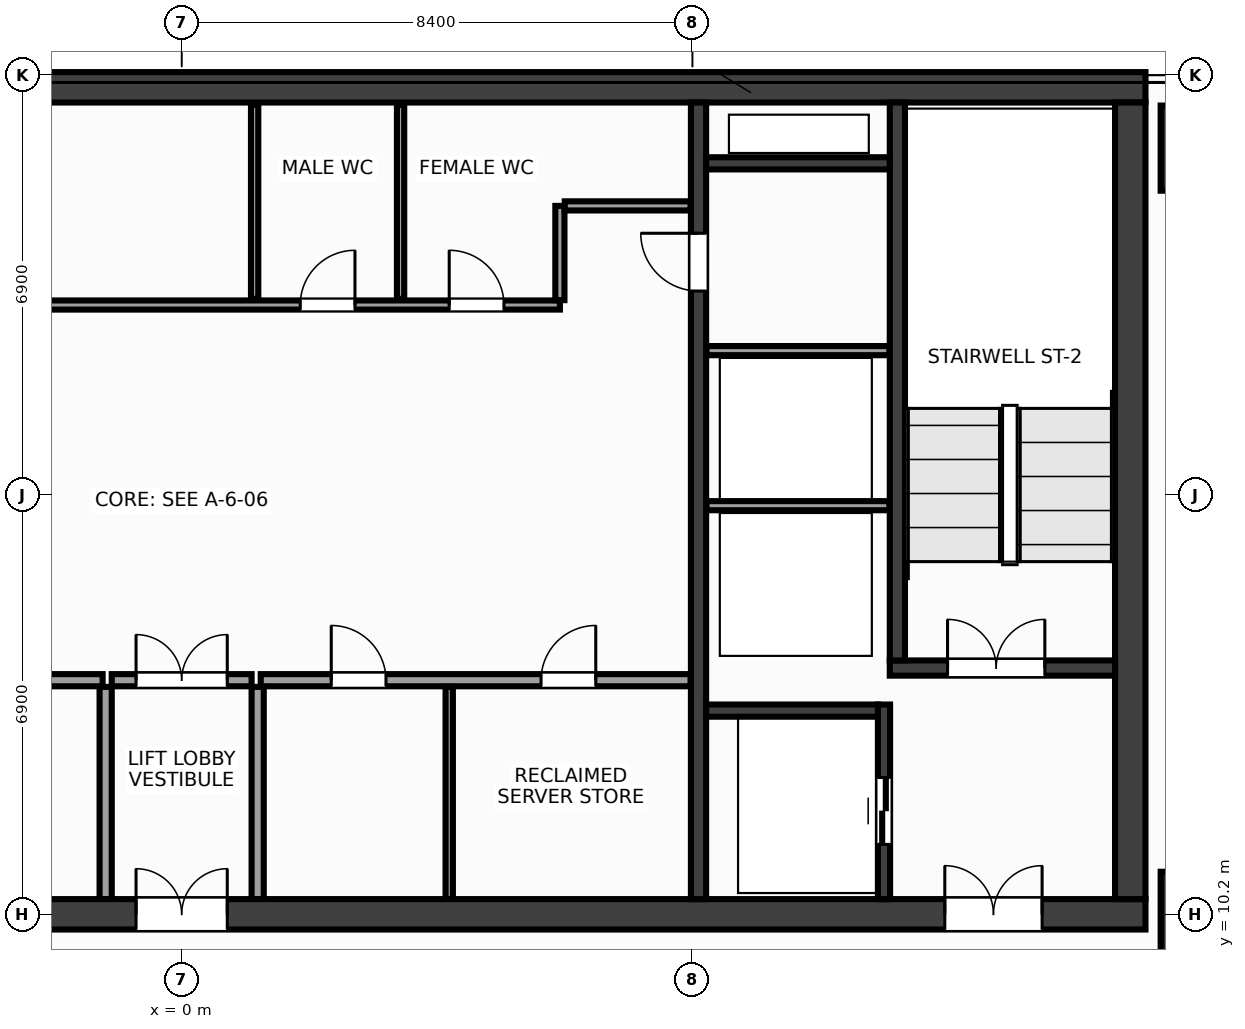
"""IFC4 building model, lengths in metres.
Left out: names, types, materials, properties, quantities, classifications, styles, units other than length and angle.
Written with IfcOpenShell. Run it as: python <this file> out.ifc"""

import sys

from ifc_helpers import new_model, si_unit, direction, frame, frame_2d, origin, origin_2d, place, context, subcontext, project, spatial, rectangle, extrude, source, transform, mapped, element, fill, save


model = new_model("IFC4")
c1 = context("Model", 3, precision=1e-05, world=origin(), true_north=direction((0.0, 1.0)))
c2 = subcontext(c1, "Body", "Model", "MODEL_VIEW")
j1 = project(units=[si_unit("LENGTHUNIT", "METRE"), si_unit("PLANEANGLEUNIT", "RADIAN")], contexts=[c1])
p1 = place(None, origin())
s1 = spatial("IfcSite", under=j1, at=p1, CompositionType="ELEMENT")
p2 = place(p1, origin())
s2 = spatial("IfcBuilding", under=s1, at=p2, CompositionType="ELEMENT")
p3 = place(p2, frame((0.0, 0.0, 221.6)))
s3 = spatial("IfcBuildingStorey", under=s2, at=p3, CompositionType="ELEMENT", Elevation=221.6)
m1 = source(origin(), c2, "Body", "SweptSolid", [
    extrude(rectangle(XDim=31.7, YDim=0.5, at=frame_2d((15.85, 0.0))), origin(), (0.0, 0.0, 1.0), 3.6),
])
p4 = place(p3, frame((-15.85, 23.8, 0.0), z_axis=(0.0, 0.0, 1.0), x_axis=(1.0, 0.0, 0.0)))
e1 = element("IfcWall", 1, at=p4, inside=s3, PredefinedType="SHEAR", context=c2, shape_type="MappedRepresentation", body=[
    mapped(m1, transform((0.0, 0.0, 0.0), x_axis=(1.0, 0.0, 0.0), y_axis=(0.0, 1.0, 0.0), z_axis=(0.0, 0.0, 1.0), scale=1.0)),
])
p5 = place(p3, frame((-15.85, 10.2, 0.0), z_axis=(0.0, 0.0, 1.0), x_axis=(1.0, 0.0, 0.0)))
e2 = element("IfcWall", 2, at=p5, inside=s3, PredefinedType="SHEAR", context=c2, shape_type="MappedRepresentation", body=[
    mapped(m1, transform((0.0, 0.0, 0.0), x_axis=(1.0, 0.0, 0.0), y_axis=(0.0, 1.0, 0.0), z_axis=(0.0, 0.0, 1.0), scale=1.0)),
])
p6 = place(p5, frame((1.7, 0.0, 0.0)))
e3 = element("IfcOpeningElement", 3, at=p6, cuts=e2, PredefinedType="OPENING", context=c2, shape_type="SweptSolid", body=[
    extrude(rectangle(XDim=1.6, YDim=2.15, at=frame_2d((0.8, 1.075))), frame((0.0, 0.262, 0.0), z_axis=(0.0, -1.0, 0.0), x_axis=(1.0, 0.0, 0.0)), (0.0, 0.0, 1.0), 0.524),
])
p7 = place(p5, frame((28.4, 0.0, 0.0)))
e4 = element("IfcOpeningElement", 4, at=p7, cuts=e2, PredefinedType="OPENING", context=c2, shape_type="SweptSolid", body=[
    extrude(rectangle(XDim=1.6, YDim=2.15, at=frame_2d((0.8, 1.075))), frame((0.0, 0.262, 0.0), z_axis=(0.0, -1.0, 0.0), x_axis=(1.0, 0.0, 0.0)), (0.0, 0.0, 1.0), 0.524),
])
p8 = place(p5, frame((15.1, 0.0, 0.0)))
e5 = element("IfcOpeningElement", 5, at=p8, cuts=e2, PredefinedType="OPENING", context=c2, shape_type="SweptSolid", body=[
    extrude(rectangle(XDim=1.5, YDim=2.2, at=frame_2d((0.75, 1.1))), frame((0.0, 0.262, 0.0), z_axis=(0.0, -1.0, 0.0), x_axis=(1.0, 0.0, 0.0)), (0.0, 0.0, 1.0), 0.524),
])
m2 = source(origin(), c2, "Body", "SweptSolid", [
    extrude(rectangle(XDim=13.1, YDim=0.5, at=frame_2d((6.55, 0.0))), origin(), (0.0, 0.0, 1.0), 3.6),
])
p9 = place(p3, frame((15.6, 10.45, 0.0), z_axis=(0.0, 0.0, 1.0), x_axis=(0.0, 1.0, 0.0)))
e6 = element("IfcWall", 6, at=p9, inside=s3, PredefinedType="SHEAR", context=c2, shape_type="MappedRepresentation", body=[
    mapped(m2, transform((0.0, 0.0, 0.0), x_axis=(1.0, 0.0, 0.0), y_axis=(0.0, 1.0, 0.0), z_axis=(0.0, 0.0, 1.0), scale=1.0)),
])
m3 = source(origin(), c2, "Body", "SweptSolid", [
    extrude(rectangle(XDim=13.1, YDim=0.25, at=frame_2d((6.55, 0.0))), origin(), (0.0, 0.0, 1.0), 3.6),
])
p10 = place(p3, frame((8.5, 10.45, 0.0), z_axis=(0.0, 0.0, 1.0), x_axis=(0.0, 1.0, 0.0)))
e7 = element("IfcWall", 7, at=p10, inside=s3, PredefinedType="SHEAR", context=c2, shape_type="MappedRepresentation", body=[
    mapped(m3, transform((0.0, 0.0, 0.0), x_axis=(1.0, 0.0, 0.0), y_axis=(0.0, 1.0, 0.0), z_axis=(0.0, 0.0, 1.0), scale=1.0)),
])
p11 = place(p10, frame((10.0, 0.0, 0.0)))
e8 = element("IfcOpeningElement", 8, at=p11, cuts=e7, PredefinedType="OPENING", context=c2, shape_type="SweptSolid", body=[
    extrude(rectangle(XDim=0.95, YDim=2.15, at=frame_2d((0.475, 1.075))), frame((0.0, 0.137, 0.0), z_axis=(0.0, -1.0, 0.0), x_axis=(1.0, 0.0, 0.0)), (0.0, 0.0, 1.0), 0.274),
])
m4 = source(origin(), c2, "Body", "SweptSolid", [
    extrude(rectangle(XDim=3.705, YDim=0.25, at=frame_2d((1.853, 0.0))), origin(), (0.0, 0.0, 1.0), 3.6),
])
p12 = place(p3, frame((11.645, 14.25, 0.0), z_axis=(0.0, 0.0, 1.0), x_axis=(1.0, 0.0, 0.0)))
e9 = element("IfcWall", 9, at=p12, inside=s3, PredefinedType="SHEAR", context=c2, shape_type="MappedRepresentation", body=[
    mapped(m4, transform((0.0, 0.0, 0.0), x_axis=(1.0, 0.0, 0.0), y_axis=(0.0, 1.0, 0.0), z_axis=(0.0, 0.0, 1.0), scale=1.0)),
])
p13 = place(p12, frame((0.95, 0.0, 0.0)))
e10 = element("IfcOpeningElement", 10, at=p13, cuts=e9, PredefinedType="OPENING", context=c2, shape_type="SweptSolid", body=[
    extrude(rectangle(XDim=1.6, YDim=2.15, at=frame_2d((0.8, 1.075))), frame((0.0, 0.137, 0.0), z_axis=(0.0, -1.0, 0.0), x_axis=(1.0, 0.0, 0.0)), (0.0, 0.0, 1.0), 0.274),
])
m5 = source(origin(), c2, "Body", "SweptSolid", [
    extrude(rectangle(XDim=9.175, YDim=0.25, at=frame_2d((4.587, 0.0))), origin(), (0.0, 0.0, 1.0), 3.6),
])
p14 = place(p3, frame((11.77, 14.375, 0.0), z_axis=(0.0, 0.0, 1.0), x_axis=(0.0, 1.0, 0.0)))
e11 = element("IfcWall", 11, at=p14, inside=s3, PredefinedType="SHEAR", context=c2, shape_type="MappedRepresentation", body=[
    mapped(m5, transform((0.0, 0.0, 0.0), x_axis=(1.0, 0.0, 0.0), y_axis=(0.0, 1.0, 0.0), z_axis=(0.0, 0.0, 1.0), scale=1.0)),
])
m6 = source(origin(), c2, "Body", "SweptSolid", [
    extrude(rectangle(XDim=3.2, YDim=0.2, at=frame_2d((1.6, 0.0))), origin(), (0.0, 0.0, 1.0), 3.6),
])
p15 = place(p3, frame((11.55, 10.45, 0.0), z_axis=(0.0, 0.0, 1.0), x_axis=(0.0, 1.0, 0.0)))
e12 = element("IfcWall", 12, at=p15, inside=s3, PredefinedType="SHEAR", context=c2, shape_type="MappedRepresentation", body=[
    mapped(m6, transform((0.0, 0.0, 0.0), x_axis=(1.0, 0.0, 0.0), y_axis=(0.0, 1.0, 0.0), z_axis=(0.0, 0.0, 1.0), scale=1.0)),
])
p16 = place(p15, frame((0.9, 0.0, 0.0)))
e13 = element("IfcOpeningElement", 13, at=p16, cuts=e12, PredefinedType="OPENING", context=c2, shape_type="SweptSolid", body=[
    extrude(rectangle(XDim=1.1, YDim=2.15, at=frame_2d((0.55, 1.075))), frame((0.0, 0.112, 0.0), z_axis=(0.0, -1.0, 0.0), x_axis=(1.0, 0.0, 0.0)), (0.0, 0.0, 1.0), 0.224),
])
m7 = source(origin(), c2, "Body", "SweptSolid", [
    extrude(rectangle(XDim=2.825, YDim=0.2, at=frame_2d((1.413, 0.0))), origin(), (0.0, 0.0, 1.0), 3.6),
])
p17 = place(p3, frame((8.625, 13.55, 0.0), z_axis=(0.0, 0.0, 1.0), x_axis=(1.0, 0.0, 0.0)))
e14 = element("IfcWall", 14, at=p17, inside=s3, PredefinedType="SHEAR", context=c2, shape_type="MappedRepresentation", body=[
    mapped(m7, transform((0.0, 0.0, 0.0), x_axis=(1.0, 0.0, 0.0), y_axis=(0.0, 1.0, 0.0), z_axis=(0.0, 0.0, 1.0), scale=1.0)),
])
m8 = source(origin(), c2, "Body", "SweptSolid", [
    extrude(rectangle(XDim=3.02, YDim=0.2, at=frame_2d((1.51, 0.0))), origin(), (0.0, 0.0, 1.0), 3.6),
])
p18 = place(p3, frame((8.625, 22.55, 0.0), z_axis=(0.0, 0.0, 1.0), x_axis=(1.0, 0.0, 0.0)))
e15 = element("IfcWall", 15, at=p18, inside=s3, PredefinedType="SHEAR", context=c2, shape_type="MappedRepresentation", body=[
    mapped(m8, transform((0.0, 0.0, 0.0), x_axis=(1.0, 0.0, 0.0), y_axis=(0.0, 1.0, 0.0), z_axis=(0.0, 0.0, 1.0), scale=1.0)),
])
m9 = source(origin(), c2, "Body", "SweptSolid", [
    extrude(rectangle(XDim=1.4, YDim=1.4, at=origin_2d()), origin(), (0.0, 0.0, 1.0), 3.6),
])
for number, where, z_axis, x_axis in (
    (16, (16.8, 10.2, 0.0), (0.0, 0.0, 1.0), (1.0, 0.0, 0.0)),
    (17, (16.8, 22.8, 0.0), (0.0, 0.0, 1.0), (1.0, 0.0, 0.0)),
):
    element("IfcColumn", number, at=place(p3, frame(where, z_axis=z_axis, x_axis=x_axis)), inside=s3, PredefinedType="COLUMN", context=c2, shape_type="MappedRepresentation", body=[
        mapped(m9, transform((0.0, 0.0, 0.0), x_axis=(1.0, 0.0, 0.0), y_axis=(0.0, 1.0, 0.0), z_axis=(0.0, 0.0, 1.0), scale=1.0)),
    ])
m10 = source(origin(), c2, "Body", "SweptSolid", [
    extrude(rectangle(XDim=3.01, YDim=0.15, at=frame_2d((1.505, 0.0))), origin(), (0.0, 0.0, 1.0), 3.38),
])
for number, where, z_axis, x_axis in (
    (18, (8.63, 16.92, 0.0), (0.0, 0.0, 1.0), (1.0, 0.0, 0.0)),
    (19, (8.63, 19.47, 0.0), (0.0, 0.0, 1.0), (1.0, 0.0, 0.0)),
):
    element("IfcWall", number, at=place(p3, frame(where, z_axis=z_axis, x_axis=x_axis)), inside=s3, PredefinedType="PARTITIONING", context=c2, shape_type="MappedRepresentation", body=[
        mapped(m10, transform((0.0, 0.0, 0.0), x_axis=(1.0, 0.0, 0.0), y_axis=(0.0, 1.0, 0.0), z_axis=(0.0, 0.0, 1.0), scale=1.0)),
    ])
m11 = source(origin(), c2, "Body", "SweptSolid", [
    extrude(rectangle(XDim=7.07, YDim=0.2, at=frame_2d((3.535, 0.0))), origin(), (0.0, 0.0, 1.0), 3.38),
])
p19 = place(p3, frame((-8.37, 14.05, 0.0), z_axis=(0.0, 0.0, 1.0), x_axis=(1.0, 0.0, 0.0)))
e20 = element("IfcWall", 20, at=p19, inside=s3, PredefinedType="PARTITIONING", context=c2, shape_type="MappedRepresentation", body=[
    mapped(m11, transform((0.0, 0.0, 0.0), x_axis=(1.0, 0.0, 0.0), y_axis=(0.0, 1.0, 0.0), z_axis=(0.0, 0.0, 1.0), scale=1.0)),
])
p20 = place(p19, frame((2.8, 0.0, 0.0)))
e21 = element("IfcOpeningElement", 21, at=p20, cuts=e20, PredefinedType="OPENING", context=c2, shape_type="SweptSolid", body=[
    extrude(rectangle(XDim=0.98, YDim=2.15, at=frame_2d((0.49, 1.075))), frame((0.0, 0.112, 0.0), z_axis=(0.0, -1.0, 0.0), x_axis=(1.0, 0.0, 0.0)), (0.0, 0.0, 1.0), 0.224),
])
p21 = place(p3, frame((1.3, 14.05, 0.0), z_axis=(0.0, 0.0, 1.0), x_axis=(1.0, 0.0, 0.0)))
e22 = element("IfcWall", 22, at=p21, inside=s3, PredefinedType="PARTITIONING", context=c2, shape_type="MappedRepresentation", body=[
    mapped(m11, transform((0.0, 0.0, 0.0), x_axis=(1.0, 0.0, 0.0), y_axis=(0.0, 1.0, 0.0), z_axis=(0.0, 0.0, 1.0), scale=1.0)),
])
p22 = place(p21, frame((1.16, 0.0, 0.0)))
e23 = element("IfcOpeningElement", 23, at=p22, cuts=e22, PredefinedType="OPENING", context=c2, shape_type="SweptSolid", body=[
    extrude(rectangle(XDim=0.9, YDim=2.15, at=frame_2d((0.45, 1.075))), frame((0.0, 0.112, 0.0), z_axis=(0.0, -1.0, 0.0), x_axis=(1.0, 0.0, 0.0)), (0.0, 0.0, 1.0), 0.224),
])
p23 = place(p21, frame((4.61, 0.0, 0.0)))
e24 = element("IfcOpeningElement", 24, at=p23, cuts=e22, PredefinedType="OPENING", context=c2, shape_type="SweptSolid", body=[
    extrude(rectangle(XDim=0.9, YDim=2.15, at=frame_2d((0.45, 1.075))), frame((0.0, 0.112, 0.0), z_axis=(0.0, -1.0, 0.0), x_axis=(1.0, 0.0, 0.0)), (0.0, 0.0, 1.0), 0.224),
])
m12 = source(origin(), c2, "Body", "SweptSolid", [
    extrude(rectangle(XDim=3.49, YDim=0.2, at=frame_2d((1.745, 0.0))), origin(), (0.0, 0.0, 1.0), 3.38),
])
for number, where, z_axis, x_axis in (
    (25, (-1.25, 10.45, 0.0), (0.0, 0.0, 1.0), (0.0, 1.0, 0.0)),
    (26, (1.25, 10.45, 0.0), (0.0, 0.0, 1.0), (0.0, 1.0, 0.0)),
):
    element("IfcWall", number, at=place(p3, frame(where, z_axis=z_axis, x_axis=x_axis)), inside=s3, PredefinedType="PARTITIONING", context=c2, shape_type="MappedRepresentation", body=[
        mapped(m12, transform((0.0, 0.0, 0.0), x_axis=(1.0, 0.0, 0.0), y_axis=(0.0, 1.0, 0.0), z_axis=(0.0, 0.0, 1.0), scale=1.0)),
    ])
m13 = source(origin(), c2, "Body", "SweptSolid", [
    extrude(rectangle(XDim=2.3, YDim=0.2, at=frame_2d((1.15, 0.0))), origin(), (0.0, 0.0, 1.0), 3.38),
])
p24 = place(p3, frame((-1.15, 14.05, 0.0), z_axis=(0.0, 0.0, 1.0), x_axis=(1.0, 0.0, 0.0)))
e27 = element("IfcWall", 27, at=p24, inside=s3, PredefinedType="PARTITIONING", context=c2, shape_type="MappedRepresentation", body=[
    mapped(m13, transform((0.0, 0.0, 0.0), x_axis=(1.0, 0.0, 0.0), y_axis=(0.0, 1.0, 0.0), z_axis=(0.0, 0.0, 1.0), scale=1.0)),
])
p25 = place(p24, frame((0.4, 0.0, 0.0)))
e28 = element("IfcOpeningElement", 28, at=p25, cuts=e27, PredefinedType="OPENING", context=c2, shape_type="SweptSolid", body=[
    extrude(rectangle(XDim=1.5, YDim=2.2, at=frame_2d((0.75, 1.1))), frame((0.0, 0.112, 0.0), z_axis=(0.0, -1.0, 0.0), x_axis=(1.0, 0.0, 0.0)), (0.0, 0.0, 1.0), 0.224),
])
m14 = source(origin(), c2, "Body", "SweptSolid", [
    extrude(rectangle(XDim=14.59, YDim=0.15, at=frame_2d((7.295, 0.0))), origin(), (0.0, 0.0, 1.0), 3.38),
])
p26 = place(p3, frame((-8.37, 20.22, 0.0), z_axis=(0.0, 0.0, 1.0), x_axis=(1.0, 0.0, 0.0)))
e29 = element("IfcWall", 29, at=p26, inside=s3, PredefinedType="PARTITIONING", context=c2, shape_type="MappedRepresentation", body=[
    mapped(m14, transform((0.0, 0.0, 0.0), x_axis=(1.0, 0.0, 0.0), y_axis=(0.0, 1.0, 0.0), z_axis=(0.0, 0.0, 1.0), scale=1.0)),
])
p27 = place(p26, frame((4.36, 0.0, 0.0)))
e30 = element("IfcOpeningElement", 30, at=p27, cuts=e29, PredefinedType="OPENING", context=c2, shape_type="SweptSolid", body=[
    extrude(rectangle(XDim=0.9, YDim=2.15, at=frame_2d((0.45, 1.075))), frame((0.0, 0.087, 0.0), z_axis=(0.0, -1.0, 0.0), x_axis=(1.0, 0.0, 0.0)), (0.0, 0.0, 1.0), 0.174),
])
p28 = place(p26, frame((10.32, 0.0, 0.0)))
e31 = element("IfcOpeningElement", 31, at=p28, cuts=e29, PredefinedType="OPENING", context=c2, shape_type="SweptSolid", body=[
    extrude(rectangle(XDim=0.9, YDim=2.15, at=frame_2d((0.45, 1.075))), frame((0.0, 0.087, 0.0), z_axis=(0.0, -1.0, 0.0), x_axis=(1.0, 0.0, 0.0)), (0.0, 0.0, 1.0), 0.174),
])
p29 = place(p26, frame((12.77, 0.0, 0.0)))
e32 = element("IfcOpeningElement", 32, at=p29, cuts=e29, PredefinedType="OPENING", context=c2, shape_type="SweptSolid", body=[
    extrude(rectangle(XDim=0.9, YDim=2.15, at=frame_2d((0.45, 1.075))), frame((0.0, 0.087, 0.0), z_axis=(0.0, -1.0, 0.0), x_axis=(1.0, 0.0, 0.0)), (0.0, 0.0, 1.0), 0.174),
])
m15 = source(origin(), c2, "Body", "SweptSolid", [
    extrude(rectangle(XDim=1.55, YDim=0.15, at=frame_2d((0.775, 0.0))), origin(), (0.0, 0.0, 1.0), 3.38),
])
p30 = place(p3, frame((6.22, 20.3, 0.0), z_axis=(0.0, 0.0, 1.0), x_axis=(0.0, 1.0, 0.0)))
e33 = element("IfcWall", 33, at=p30, inside=s3, PredefinedType="PARTITIONING", context=c2, shape_type="MappedRepresentation", body=[
    mapped(m15, transform((0.0, 0.0, 0.0), x_axis=(1.0, 0.0, 0.0), y_axis=(0.0, 1.0, 0.0), z_axis=(0.0, 0.0, 1.0), scale=1.0)),
])
m16 = source(origin(), c2, "Body", "SweptSolid", [
    extrude(rectangle(XDim=2.07, YDim=0.15, at=frame_2d((1.035, 0.0))), origin(), (0.0, 0.0, 1.0), 3.38),
])
p31 = place(p3, frame((6.3, 21.85, 0.0), z_axis=(0.0, 0.0, 1.0), x_axis=(1.0, 0.0, 0.0)))
e34 = element("IfcWall", 34, at=p31, inside=s3, PredefinedType="PARTITIONING", context=c2, shape_type="MappedRepresentation", body=[
    mapped(m16, transform((0.0, 0.0, 0.0), x_axis=(1.0, 0.0, 0.0), y_axis=(0.0, 1.0, 0.0), z_axis=(0.0, 0.0, 1.0), scale=1.0)),
])
m17 = source(origin(), c2, "Body", "SweptSolid", [
    extrude(rectangle(XDim=3.49, YDim=0.12, at=frame_2d((1.745, 0.0))), origin(), (0.0, 0.0, 1.0), 3.38),
])
p32 = place(p3, frame((4.4, 10.45, 0.0), z_axis=(0.0, 0.0, 1.0), x_axis=(0.0, 1.0, 0.0)))
e35 = element("IfcWall", 35, at=p32, inside=s3, PredefinedType="PARTITIONING", context=c2, shape_type="MappedRepresentation", body=[
    mapped(m17, transform((0.0, 0.0, 0.0), x_axis=(1.0, 0.0, 0.0), y_axis=(0.0, 1.0, 0.0), z_axis=(0.0, 0.0, 1.0), scale=1.0)),
])
m18 = source(origin(), c2, "Body", "SweptSolid", [
    extrude(rectangle(XDim=3.19, YDim=0.12, at=frame_2d((1.595, 0.0))), origin(), (0.0, 0.0, 1.0), 3.38),
])
for number, where, z_axis, x_axis in (
    (36, (1.2, 20.32, 0.0), (0.0, 0.0, 1.0), (0.0, 1.0, 0.0)),
    (37, (3.6, 20.32, 0.0), (0.0, 0.0, 1.0), (0.0, 1.0, 0.0)),
):
    element("IfcWall", number, at=place(p3, frame(where, z_axis=z_axis, x_axis=x_axis)), inside=s3, PredefinedType="PARTITIONING", context=c2, shape_type="MappedRepresentation", body=[
        mapped(m18, transform((0.0, 0.0, 0.0), x_axis=(1.0, 0.0, 0.0), y_axis=(0.0, 1.0, 0.0), z_axis=(0.0, 0.0, 1.0), scale=1.0)),
    ])
m19 = source(origin(), c2, "Body", "SweptSolid", [
    extrude(rectangle(XDim=1.6, YDim=2.15, at=frame_2d((0.8, 1.075))), frame((0.0, 0.025, 0.0), z_axis=(0.0, -1.0, 0.0), x_axis=(1.0, 0.0, 0.0)), (0.0, 0.0, 1.0), 0.05),
])
p33 = place(p13, origin())
e38 = element("IfcDoor", 38, at=p33, inside=s3, OperationType="DOUBLE_DOOR_SINGLE_SWING", PredefinedType="DOOR", context=c2, shape_type="MappedRepresentation", body=[
    mapped(m19, transform((0.0, 0.0, 0.0), x_axis=(1.0, 0.0, 0.0), y_axis=(0.0, 1.0, 0.0), z_axis=(0.0, 0.0, 1.0), scale=1.0)),
])
fill(e10, e38)
p34 = place(p7, origin())
e39 = element("IfcDoor", 39, at=p34, inside=s3, OperationType="DOUBLE_DOOR_SINGLE_SWING", PredefinedType="DOOR", context=c2, shape_type="MappedRepresentation", body=[
    mapped(m19, transform((0.0, 0.0, 0.0), x_axis=(1.0, 0.0, 0.0), y_axis=(0.0, 1.0, 0.0), z_axis=(0.0, 0.0, 1.0), scale=1.0)),
])
fill(e4, e39)
m20 = source(origin(), c2, "Body", "SweptSolid", [
    extrude(rectangle(XDim=1.1, YDim=2.15, at=frame_2d((0.55, 1.075))), frame((0.0, 0.025, 0.0), z_axis=(0.0, -1.0, 0.0), x_axis=(1.0, 0.0, 0.0)), (0.0, 0.0, 1.0), 0.05),
])
p35 = place(p16, origin())
e40 = element("IfcDoor", 40, at=p35, inside=s3, OperationType="DOUBLE_DOOR_SLIDING", PredefinedType="DOOR", context=c2, shape_type="MappedRepresentation", body=[
    mapped(m20, transform((0.0, 0.0, 0.0), x_axis=(1.0, 0.0, 0.0), y_axis=(0.0, 1.0, 0.0), z_axis=(0.0, 0.0, 1.0), scale=1.0)),
])
fill(e13, e40)
m21 = source(origin(), c2, "Body", "SweptSolid", [
    extrude(rectangle(XDim=0.95, YDim=2.15, at=frame_2d((0.475, 1.075))), frame((0.0, 0.025, 0.0), z_axis=(0.0, -1.0, 0.0), x_axis=(1.0, 0.0, 0.0)), (0.0, 0.0, 1.0), 0.05),
])
p36 = place(p11, origin())
e41 = element("IfcDoor", 41, at=p36, inside=s3, OperationType="SINGLE_SWING_RIGHT", PredefinedType="DOOR", context=c2, shape_type="MappedRepresentation", body=[
    mapped(m21, transform((0.0, 0.0, 0.0), x_axis=(1.0, 0.0, 0.0), y_axis=(0.0, 1.0, 0.0), z_axis=(0.0, 0.0, 1.0), scale=1.0)),
])
fill(e8, e41)
m22 = source(origin(), c2, "Body", "SweptSolid", [
    extrude(rectangle(XDim=0.9, YDim=2.15, at=frame_2d((0.45, 1.075))), frame((0.0, 0.025, 0.0), z_axis=(0.0, -1.0, 0.0), x_axis=(1.0, 0.0, 0.0)), (0.0, 0.0, 1.0), 0.05),
])
p37 = place(p22, origin())
e42 = element("IfcDoor", 42, at=p37, inside=s3, OperationType="SINGLE_SWING_LEFT", PredefinedType="DOOR", context=c2, shape_type="MappedRepresentation", body=[
    mapped(m22, transform((0.0, 0.0, 0.0), x_axis=(1.0, 0.0, 0.0), y_axis=(0.0, 1.0, 0.0), z_axis=(0.0, 0.0, 1.0), scale=1.0)),
])
fill(e23, e42)
p38 = place(p23, origin())
e43 = element("IfcDoor", 43, at=p38, inside=s3, OperationType="SINGLE_SWING_RIGHT", PredefinedType="DOOR", context=c2, shape_type="MappedRepresentation", body=[
    mapped(m22, transform((0.0, 0.0, 0.0), x_axis=(1.0, 0.0, 0.0), y_axis=(0.0, 1.0, 0.0), z_axis=(0.0, 0.0, 1.0), scale=1.0)),
])
fill(e24, e43)
m23 = source(origin(), c2, "Body", "SweptSolid", [
    extrude(rectangle(XDim=1.5, YDim=2.2, at=frame_2d((0.75, 1.1))), frame((0.0, 0.025, 0.0), z_axis=(0.0, -1.0, 0.0), x_axis=(1.0, 0.0, 0.0)), (0.0, 0.0, 1.0), 0.05),
])
p39 = place(p25, origin())
e44 = element("IfcDoor", 44, at=p39, inside=s3, OperationType="DOUBLE_DOOR_SINGLE_SWING", PredefinedType="DOOR", context=c2, shape_type="MappedRepresentation", body=[
    mapped(m23, transform((0.0, 0.0, 0.0), x_axis=(1.0, 0.0, 0.0), y_axis=(0.0, 1.0, 0.0), z_axis=(0.0, 0.0, 1.0), scale=1.0)),
])
fill(e28, e44)
p40 = place(p8, origin())
e45 = element("IfcDoor", 45, at=p40, inside=s3, OperationType="DOUBLE_DOOR_SINGLE_SWING", PredefinedType="DOOR", context=c2, shape_type="MappedRepresentation", body=[
    mapped(m23, transform((0.0, 0.0, 0.0), x_axis=(1.0, 0.0, 0.0), y_axis=(0.0, 1.0, 0.0), z_axis=(0.0, 0.0, 1.0), scale=1.0)),
])
fill(e5, e45)
p41 = place(p28, origin())
e46 = element("IfcDoor", 46, at=p41, inside=s3, OperationType="SINGLE_SWING_RIGHT", PredefinedType="DOOR", context=c2, shape_type="MappedRepresentation", body=[
    mapped(m22, transform((0.0, 0.0, 0.0), x_axis=(1.0, 0.0, 0.0), y_axis=(0.0, 1.0, 0.0), z_axis=(0.0, 0.0, 1.0), scale=1.0)),
])
fill(e31, e46)
p42 = place(p29, origin())
e47 = element("IfcDoor", 47, at=p42, inside=s3, OperationType="SINGLE_SWING_LEFT", PredefinedType="DOOR", context=c2, shape_type="MappedRepresentation", body=[
    mapped(m22, transform((0.0, 0.0, 0.0), x_axis=(1.0, 0.0, 0.0), y_axis=(0.0, 1.0, 0.0), z_axis=(0.0, 0.0, 1.0), scale=1.0)),
])
fill(e32, e47)
save(model, sys.argv[1])
